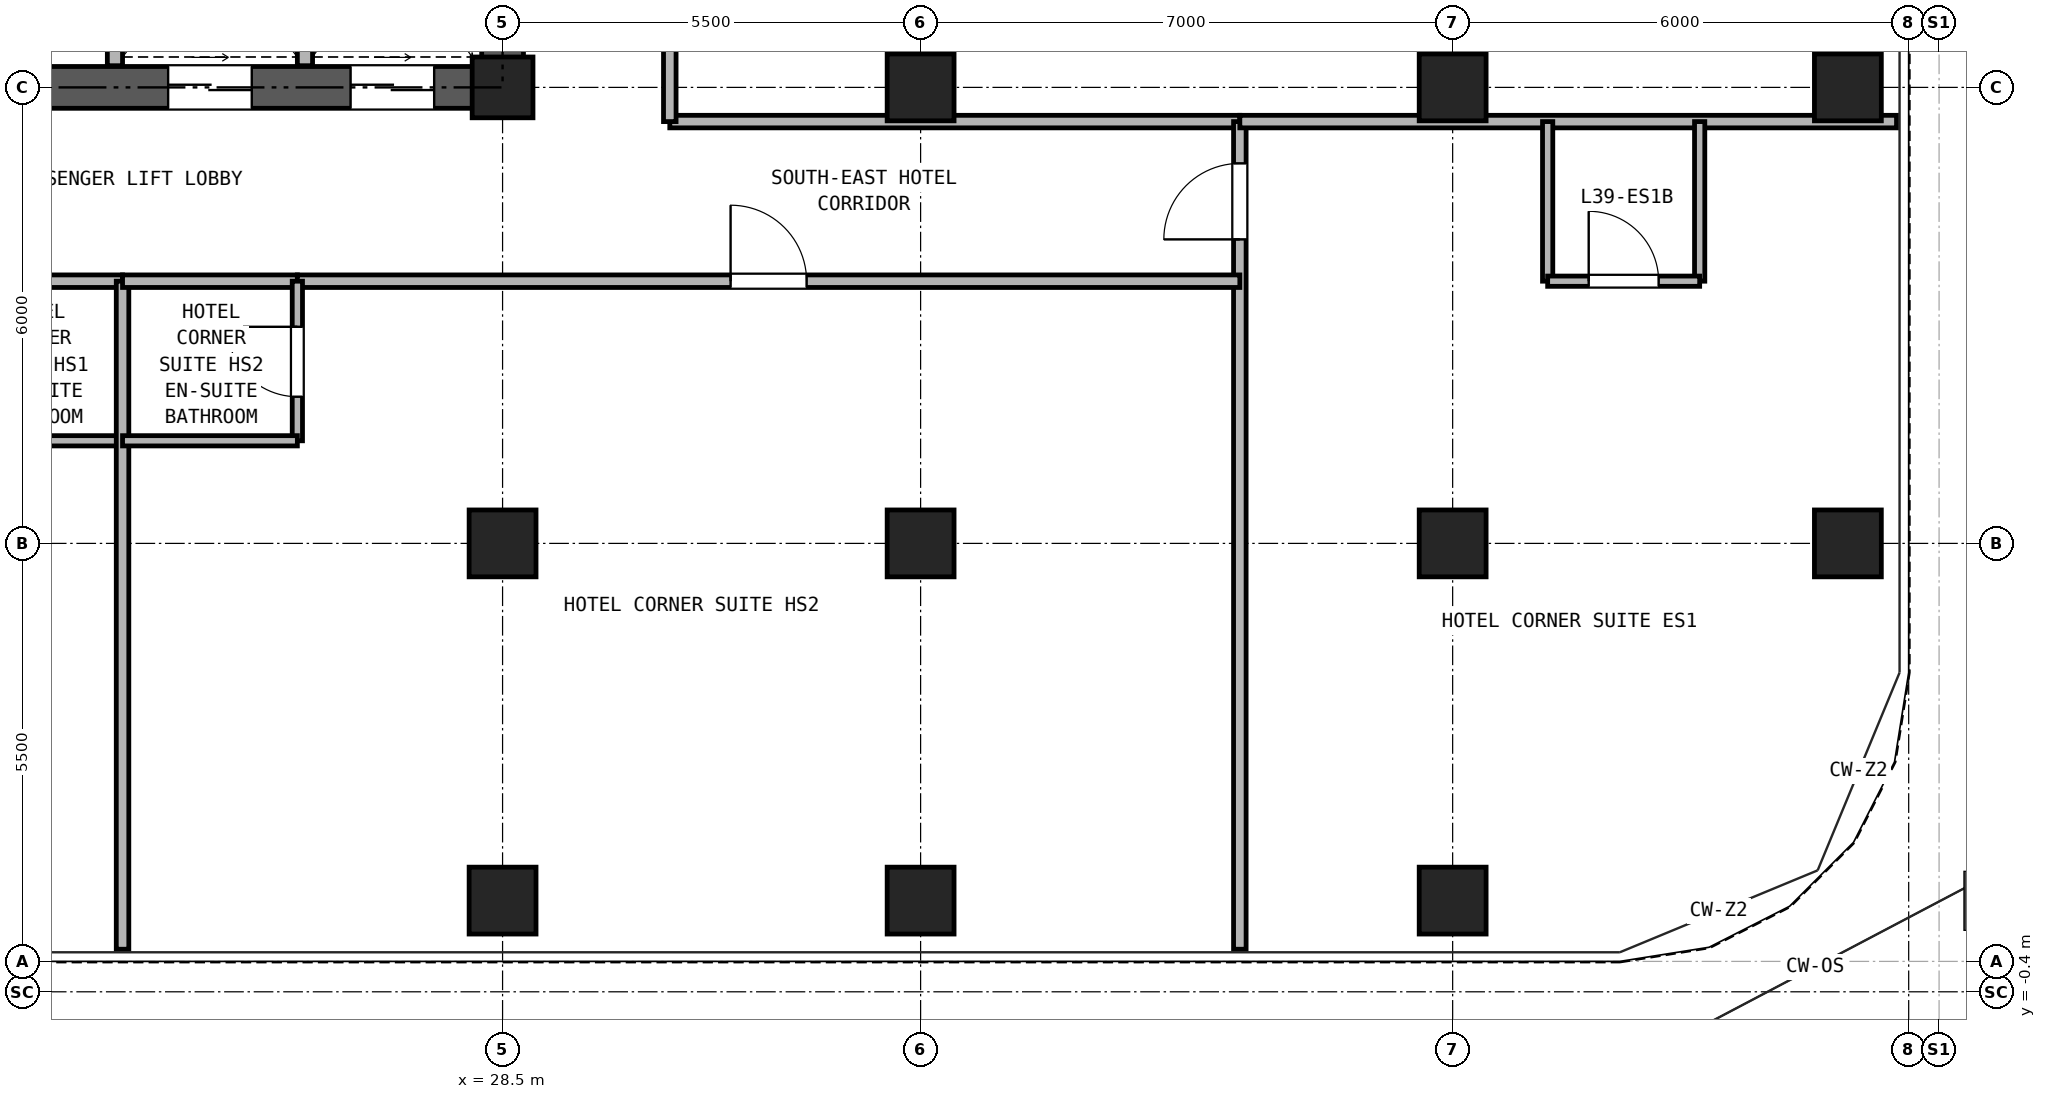
"""IFC4 building model, lengths in metres.
Left out: names, types, materials, properties, quantities, classifications, styles, units other than length and angle.
Written with IfcOpenShell. Run it as: python <this file> out.ifc"""

import sys

from ifc_helpers import new_model, si_unit, direction, frame, frame_2d, origin, origin_2d, place, context, subcontext, project, spatial, rectangle, hollow_rectangle, extrude, source, transform, mapped, element, fill, save


model = new_model("IFC4")
c1 = context("Model", 3, precision=1e-05, world=origin(), true_north=direction((0.0, 1.0)))
c2 = subcontext(c1, "Body", "Model", "MODEL_VIEW")
j1 = project(units=[si_unit("LENGTHUNIT", "METRE"), si_unit("PLANEANGLEUNIT", "RADIAN")], contexts=[c1])
p1 = place(None, origin())
s1 = spatial("IfcSite", under=j1, at=p1, CompositionType="ELEMENT")
p2 = place(p1, origin())
s2 = spatial("IfcBuilding", under=s1, at=p2, CompositionType="ELEMENT")
p3 = place(p2, frame((0.0, 0.0, 140.7)))
s3 = spatial("IfcBuildingStorey", under=s2, at=p3, CompositionType="ELEMENT", Elevation=140.7)
m1 = source(origin(), c2, "Body", "SweptSolid", [
    extrude(hollow_rectangle(XDim=0.88, YDim=0.88, WallThickness=0.05, at=origin_2d()), origin(), (0.0, 0.0, 1.0), 2.84),
])
for number, where, z_axis, x_axis in (
    (1, (28.5, 0.8, 0.0), (0.0, 0.0, 1.0), (1.0, 0.0, 0.0)),
    (2, (34.0, 0.8, 0.0), (0.0, 0.0, 1.0), (1.0, 0.0, 0.0)),
    (3, (41.0, 0.8, 0.0), (0.0, 0.0, 1.0), (1.0, 0.0, 0.0)),
    (4, (46.2, 5.5, 0.0), (0.0, 0.0, 1.0), (1.0, 0.0, 0.0)),
    (5, (46.2, 11.5, 0.0), (0.0, 0.0, 1.0), (1.0, 0.0, 0.0)),
    (6, (28.5, 5.5, 0.0), (0.0, 0.0, 1.0), (1.0, 0.0, 0.0)),
):
    element("IfcColumn", number, at=place(p3, frame(where, z_axis=z_axis, x_axis=x_axis)), inside=s3, PredefinedType="COLUMN", context=c2, shape_type="MappedRepresentation", body=[
        mapped(m1, transform((0.0, 0.0, 0.0), x_axis=(1.0, 0.0, 0.0), y_axis=(0.0, 1.0, 0.0), z_axis=(0.0, 0.0, 1.0), scale=1.0)),
    ])
m2 = source(origin(), c2, "Body", "SweptSolid", [
    extrude(hollow_rectangle(XDim=0.8, YDim=0.8, WallThickness=0.045, at=origin_2d()), origin(), (0.0, 0.0, 1.0), 2.84),
])
p4 = place(p3, frame((28.5, 11.5, 0.0), z_axis=(0.0, 0.0, 1.0), x_axis=(1.0, 0.0, 0.0)))
e7 = element("IfcColumn", 7, at=p4, inside=s3, PredefinedType="COLUMN", context=c2, shape_type="MappedRepresentation", body=[
    mapped(m2, transform((0.0, 0.0, 0.0), x_axis=(1.0, 0.0, 0.0), y_axis=(0.0, 1.0, 0.0), z_axis=(0.0, 0.0, 1.0), scale=1.0)),
])
for number, where, z_axis, x_axis in (
    (8, (34.0, 5.5, 0.0), (0.0, 0.0, 1.0), (1.0, 0.0, 0.0)),
    (9, (34.0, 11.5, 0.0), (0.0, 0.0, 1.0), (1.0, 0.0, 0.0)),
    (10, (41.0, 5.5, 0.0), (0.0, 0.0, 1.0), (1.0, 0.0, 0.0)),
    (11, (41.0, 11.5, 0.0), (0.0, 0.0, 1.0), (1.0, 0.0, 0.0)),
):
    element("IfcColumn", number, at=place(p3, frame(where, z_axis=z_axis, x_axis=x_axis)), inside=s3, PredefinedType="COLUMN", context=c2, shape_type="MappedRepresentation", body=[
        mapped(m1, transform((0.0, 0.0, 0.0), x_axis=(1.0, 0.0, 0.0), y_axis=(0.0, 1.0, 0.0), z_axis=(0.0, 0.0, 1.0), scale=1.0)),
    ])
p5 = place(p3, frame((18.225, 11.5, 0.0), z_axis=(0.0, 0.0, 1.0), x_axis=(1.0, 0.0, 0.0)))
e12 = element("IfcWall", 12, at=p5, inside=s3, PredefinedType="SHEAR", context=c2, shape_type="SweptSolid", body=[
    extrude(rectangle(XDim=10.55, YDim=0.55, at=frame_2d((5.275, 0.0))), origin(), (0.0, 0.0, 1.0), 2.84),
])
p6 = place(p5, frame((2.375, 0.0, 0.0)))
e13 = element("IfcOpeningElement", 13, at=p6, cuts=e12, PredefinedType="OPENING", context=c2, shape_type="SweptSolid", body=[
    extrude(rectangle(XDim=0.95, YDim=2.15, at=frame_2d((0.475, 1.075))), frame((0.0, 0.285, 0.0), z_axis=(0.0, -1.0, 0.0), x_axis=(1.0, 0.0, 0.0)), (0.0, 0.0, 1.0), 0.57),
])
p7 = place(p5, frame((5.875, 0.0, 0.0)))
e14 = element("IfcOpeningElement", 14, at=p7, cuts=e12, PredefinedType="OPENING", context=c2, shape_type="SweptSolid", body=[
    extrude(rectangle(XDim=1.1, YDim=2.25, at=frame_2d((0.55, 1.125))), frame((0.0, 0.285, 0.0), z_axis=(0.0, -1.0, 0.0), x_axis=(1.0, 0.0, 0.0)), (0.0, 0.0, 1.0), 0.57),
])
p8 = place(p5, frame((8.275, 0.0, 0.0)))
e15 = element("IfcOpeningElement", 15, at=p8, cuts=e12, PredefinedType="OPENING", context=c2, shape_type="SweptSolid", body=[
    extrude(rectangle(XDim=1.1, YDim=2.25, at=frame_2d((0.55, 1.125))), frame((0.0, 0.285, 0.0), z_axis=(0.0, -1.0, 0.0), x_axis=(1.0, 0.0, 0.0)), (0.0, 0.0, 1.0), 0.57),
])
p9 = place(p3, frame((28.5, 11.775, 0.0), z_axis=(0.0, 0.0, 1.0), x_axis=(0.0, 1.0, 0.0)))
e16 = element("IfcWall", 16, at=p9, inside=s3, PredefinedType="SHEAR", context=c2, shape_type="SweptSolid", body=[
    extrude(rectangle(XDim=16.7, YDim=0.55, at=frame_2d((8.35, 0.0))), origin(), (0.0, 0.0, 1.0), 2.84),
])
p10 = place(p9, frame((7.375, 0.0, 0.0)))
e17 = element("IfcOpeningElement", 17, at=p10, cuts=e16, PredefinedType="OPENING", context=c2, shape_type="SweptSolid", body=[
    extrude(rectangle(XDim=1.15, YDim=2.2, at=frame_2d((0.575, 1.1))), frame((0.0, 0.285, 0.0), z_axis=(0.0, -1.0, 0.0), x_axis=(1.0, 0.0, 0.0)), (0.0, 0.0, 1.0), 0.57),
])
for number, where, z_axis, x_axis in (
    (18, (23.4, 11.785, 0.0), (0.0, 0.0, 1.0), (0.0, 1.0, 0.0)),
    (19, (25.9, 11.785, 0.0), (0.0, 0.0, 1.0), (0.0, 1.0, 0.0)),
):
    element("IfcWall", number, at=place(p3, frame(where, z_axis=z_axis, x_axis=x_axis)), inside=s3, PredefinedType="PARTITIONING", context=c2, shape_type="SweptSolid", body=[
        extrude(rectangle(XDim=3.215, YDim=0.2, at=frame_2d((1.607, 0.0))), origin(), (0.0, 0.0, 1.0), 2.84),
    ])
p11 = place(p3, frame((30.7, 11.05, 0.0), z_axis=(0.0, 0.0, 1.0), x_axis=(1.0, 0.0, 0.0)))
e20 = element("IfcWall", 20, at=p11, inside=s3, PredefinedType="PARTITIONING", context=c2, shape_type="SweptSolid", body=[
    extrude(rectangle(XDim=7.5, YDim=0.165, at=frame_2d((3.75, 0.0))), origin(), (0.0, 0.0, 1.0), 2.84),
])
p12 = place(p3, frame((30.7, 11.05, 0.0), z_axis=(0.0, 0.0, 1.0), x_axis=(0.0, 1.0, 0.0)))
e21 = element("IfcWall", 21, at=p12, inside=s3, PredefinedType="PARTITIONING", context=c2, shape_type="SweptSolid", body=[
    extrude(rectangle(XDim=18.2, YDim=0.165, at=frame_2d((9.1, 0.0))), origin(), (0.0, 0.0, 1.0), 2.84),
])
p13 = place(p12, frame((4.05, 0.0, 0.0)))
e22 = element("IfcOpeningElement", 22, at=p13, cuts=e21, PredefinedType="OPENING", context=c2, shape_type="SweptSolid", body=[
    extrude(rectangle(XDim=0.95, YDim=2.15, at=frame_2d((0.475, 1.075))), frame((0.0, 0.093, 0.0), z_axis=(0.0, -1.0, 0.0), x_axis=(1.0, 0.0, 0.0)), (0.0, 0.0, 1.0), 0.185),
])
p14 = place(p12, frame((13.15, 0.0, 0.0)))
e23 = element("IfcOpeningElement", 23, at=p14, cuts=e21, PredefinedType="OPENING", context=c2, shape_type="SweptSolid", body=[
    extrude(rectangle(XDim=0.95, YDim=2.15, at=frame_2d((0.475, 1.075))), frame((0.0, 0.093, 0.0), z_axis=(0.0, -1.0, 0.0), x_axis=(1.0, 0.0, 0.0)), (0.0, 0.0, 1.0), 0.185),
])
p15 = place(p3, frame((38.2, 0.16, 0.0), z_axis=(0.0, 0.0, 1.0), x_axis=(0.0, 1.0, 0.0)))
e24 = element("IfcWall", 24, at=p15, inside=s3, PredefinedType="PARTITIONING", context=c2, shape_type="SweptSolid", body=[
    extrude(rectangle(XDim=10.89, YDim=0.165, at=frame_2d((5.445, 0.0))), origin(), (0.0, 0.0, 1.0), 2.84),
])
p16 = place(p15, frame((9.34, 0.0, 0.0)))
e25 = element("IfcOpeningElement", 25, at=p16, cuts=e24, PredefinedType="OPENING", context=c2, shape_type="SweptSolid", body=[
    extrude(rectangle(XDim=1.0, YDim=2.15, at=frame_2d((0.5, 1.075))), frame((0.0, 0.093, 0.0), z_axis=(0.0, -1.0, 0.0), x_axis=(1.0, 0.0, 0.0)), (0.0, 0.0, 1.0), 0.185),
])
p17 = place(p3, frame((38.2, 11.05, 0.0), z_axis=(0.0, 0.0, 1.0), x_axis=(1.0, 0.0, 0.0)))
e26 = element("IfcWall", 26, at=p17, inside=s3, PredefinedType="PARTITIONING", context=c2, shape_type="SweptSolid", body=[
    extrude(rectangle(XDim=8.64, YDim=0.165, at=frame_2d((4.32, 0.0))), origin(), (0.0, 0.0, 1.0), 2.84),
])
for number, where, z_axis, x_axis in (
    (27, (42.25, 8.95, 0.0), (0.0, 0.0, 1.0), (0.0, 1.0, 0.0)),
    (28, (44.25, 8.95, 0.0), (0.0, 0.0, 1.0), (0.0, 1.0, 0.0)),
):
    element("IfcWall", number, at=place(p3, frame(where, z_axis=z_axis, x_axis=x_axis)), inside=s3, PredefinedType="PARTITIONING", context=c2, shape_type="SweptSolid", body=[
        extrude(rectangle(XDim=2.1, YDim=0.135, at=frame_2d((1.05, 0.0))), origin(), (0.0, 0.0, 1.0), 2.84),
    ])
p18 = place(p3, frame((42.25, 8.95, 0.0), z_axis=(0.0, 0.0, 1.0), x_axis=(1.0, 0.0, 0.0)))
e29 = element("IfcWall", 29, at=p18, inside=s3, PredefinedType="PARTITIONING", context=c2, shape_type="SweptSolid", body=[
    extrude(rectangle(XDim=2.0, YDim=0.135, at=frame_2d((1.0, 0.0))), origin(), (0.0, 0.0, 1.0), 2.84),
])
p19 = place(p18, frame((0.54, 0.0, 0.0)))
e30 = element("IfcOpeningElement", 30, at=p19, cuts=e29, PredefinedType="OPENING", context=c2, shape_type="SweptSolid", body=[
    extrude(rectangle(XDim=0.92, YDim=2.1, at=frame_2d((0.46, 1.05))), frame((0.0, 0.077, 0.0), z_axis=(0.0, -1.0, 0.0), x_axis=(1.0, 0.0, 0.0)), (0.0, 0.0, 1.0), 0.155),
])
p20 = place(p3, frame((21.2, 8.95, 0.0), z_axis=(0.0, 0.0, 1.0), x_axis=(1.0, 0.0, 0.0)))
e31 = element("IfcWall", 31, at=p20, inside=s3, PredefinedType="PARTITIONING", context=c2, shape_type="SweptSolid", body=[
    extrude(rectangle(XDim=2.3, YDim=0.165, at=frame_2d((1.15, 0.0))), origin(), (0.0, 0.0, 1.0), 2.84),
])
p21 = place(p3, frame((21.2, 6.85, 0.0), z_axis=(0.0, 0.0, 1.0), x_axis=(1.0, 0.0, 0.0)))
e32 = element("IfcWall", 32, at=p21, inside=s3, PredefinedType="PARTITIONING", context=c2, shape_type="SweptSolid", body=[
    extrude(rectangle(XDim=2.3, YDim=0.135, at=frame_2d((1.15, 0.0))), origin(), (0.0, 0.0, 1.0), 2.84),
])
p22 = place(p3, frame((23.5, 0.16, 0.0), z_axis=(0.0, 0.0, 1.0), x_axis=(0.0, 1.0, 0.0)))
e33 = element("IfcWall", 33, at=p22, inside=s3, PredefinedType="PARTITIONING", context=c2, shape_type="SweptSolid", body=[
    extrude(rectangle(XDim=8.79, YDim=0.165, at=frame_2d((4.395, 0.0))), origin(), (0.0, 0.0, 1.0), 2.84),
])
p23 = place(p3, frame((23.5, 8.95, 0.0), z_axis=(0.0, 0.0, 1.0), x_axis=(1.0, 0.0, 0.0)))
e34 = element("IfcWall", 34, at=p23, inside=s3, PredefinedType="PARTITIONING", context=c2, shape_type="SweptSolid", body=[
    extrude(rectangle(XDim=2.3, YDim=0.165, at=frame_2d((1.15, 0.0))), origin(), (0.0, 0.0, 1.0), 2.84),
])
p24 = place(p3, frame((25.8, 8.95, 0.0), z_axis=(0.0, 0.0, 1.0), x_axis=(1.0, 0.0, 0.0)))
e35 = element("IfcWall", 35, at=p24, inside=s3, PredefinedType="PARTITIONING", context=c2, shape_type="SweptSolid", body=[
    extrude(rectangle(XDim=12.4, YDim=0.165, at=frame_2d((6.2, 0.0))), origin(), (0.0, 0.0, 1.0), 2.84),
])
p25 = place(p24, frame((5.7, 0.0, 0.0)))
e36 = element("IfcOpeningElement", 36, at=p25, cuts=e35, PredefinedType="OPENING", context=c2, shape_type="SweptSolid", body=[
    extrude(rectangle(XDim=1.0, YDim=2.15, at=frame_2d((0.5, 1.075))), frame((0.0, 0.093, 0.0), z_axis=(0.0, -1.0, 0.0), x_axis=(1.0, 0.0, 0.0)), (0.0, 0.0, 1.0), 0.185),
])
p26 = place(p3, frame((25.8, 6.85, 0.0), z_axis=(0.0, 0.0, 1.0), x_axis=(0.0, 1.0, 0.0)))
e37 = element("IfcWall", 37, at=p26, inside=s3, PredefinedType="PARTITIONING", context=c2, shape_type="SweptSolid", body=[
    extrude(rectangle(XDim=2.1, YDim=0.135, at=frame_2d((1.05, 0.0))), origin(), (0.0, 0.0, 1.0), 2.84),
])
p27 = place(p26, frame((0.58, 0.0, 0.0)))
e38 = element("IfcOpeningElement", 38, at=p27, cuts=e37, PredefinedType="OPENING", context=c2, shape_type="SweptSolid", body=[
    extrude(rectangle(XDim=0.92, YDim=2.1, at=frame_2d((0.46, 1.05))), frame((0.0, 0.077, 0.0), z_axis=(0.0, -1.0, 0.0), x_axis=(1.0, 0.0, 0.0)), (0.0, 0.0, 1.0), 0.155),
])
p28 = place(p3, frame((23.5, 6.85, 0.0), z_axis=(0.0, 0.0, 1.0), x_axis=(1.0, 0.0, 0.0)))
e39 = element("IfcWall", 39, at=p28, inside=s3, PredefinedType="PARTITIONING", context=c2, shape_type="SweptSolid", body=[
    extrude(rectangle(XDim=2.3, YDim=0.135, at=frame_2d((1.15, 0.0))), origin(), (0.0, 0.0, 1.0), 2.84),
])
p29 = place(p7, frame((1.1, 0.0, 0.0), z_axis=(0.0, 0.0, 1.0), x_axis=(-1.0, 0.0, 0.0)))
e40 = element("IfcDoor", 40, at=p29, inside=s3, OperationType="DOUBLE_DOOR_SLIDING", PredefinedType="DOOR", context=c2, shape_type="SweptSolid", body=[
    extrude(rectangle(XDim=1.1, YDim=2.25, at=frame_2d((0.55, 1.125))), frame((0.0, 0.025, 0.0), z_axis=(0.0, -1.0, 0.0), x_axis=(1.0, 0.0, 0.0)), (0.0, 0.0, 1.0), 0.05),
])
fill(e14, e40)
p30 = place(p8, frame((1.1, 0.0, 0.0), z_axis=(0.0, 0.0, 1.0), x_axis=(-1.0, 0.0, 0.0)))
e41 = element("IfcDoor", 41, at=p30, inside=s3, OperationType="DOUBLE_DOOR_SLIDING", PredefinedType="DOOR", context=c2, shape_type="SweptSolid", body=[
    extrude(rectangle(XDim=1.1, YDim=2.25, at=frame_2d((0.55, 1.125))), frame((0.0, 0.025, 0.0), z_axis=(0.0, -1.0, 0.0), x_axis=(1.0, 0.0, 0.0)), (0.0, 0.0, 1.0), 0.05),
])
fill(e15, e41)
p31 = place(p19, origin())
e42 = element("IfcDoor", 42, at=p31, inside=s3, OperationType="SINGLE_SWING_LEFT", PredefinedType="DOOR", context=c2, shape_type="SweptSolid", body=[
    extrude(rectangle(XDim=0.92, YDim=2.1, at=frame_2d((0.46, 1.05))), frame((0.0, 0.025, 0.0), z_axis=(0.0, -1.0, 0.0), x_axis=(1.0, 0.0, 0.0)), (0.0, 0.0, 1.0), 0.05),
])
fill(e30, e42)
p32 = place(p16, frame((1.0, 0.0, 0.0), z_axis=(0.0, 0.0, 1.0), x_axis=(-1.0, 0.0, 0.0)))
e43 = element("IfcDoor", 43, at=p32, inside=s3, OperationType="SINGLE_SWING_LEFT", PredefinedType="DOOR", context=c2, shape_type="SweptSolid", body=[
    extrude(rectangle(XDim=1.0, YDim=2.15, at=frame_2d((0.5, 1.075))), frame((0.0, 0.025, 0.0), z_axis=(0.0, -1.0, 0.0), x_axis=(1.0, 0.0, 0.0)), (0.0, 0.0, 1.0), 0.05),
])
fill(e25, e43)
p33 = place(p27, frame((0.92, 0.0, 0.0), z_axis=(0.0, 0.0, 1.0), x_axis=(-1.0, 0.0, 0.0)))
e44 = element("IfcDoor", 44, at=p33, inside=s3, OperationType="SINGLE_SWING_RIGHT", PredefinedType="DOOR", context=c2, shape_type="SweptSolid", body=[
    extrude(rectangle(XDim=0.92, YDim=2.1, at=frame_2d((0.46, 1.05))), frame((0.0, 0.025, 0.0), z_axis=(0.0, -1.0, 0.0), x_axis=(1.0, 0.0, 0.0)), (0.0, 0.0, 1.0), 0.05),
])
fill(e38, e44)
p34 = place(p25, frame((1.0, 0.0, 0.0), z_axis=(0.0, 0.0, 1.0), x_axis=(-1.0, 0.0, 0.0)))
e45 = element("IfcDoor", 45, at=p34, inside=s3, OperationType="SINGLE_SWING_LEFT", PredefinedType="DOOR", context=c2, shape_type="SweptSolid", body=[
    extrude(rectangle(XDim=1.0, YDim=2.15, at=frame_2d((0.5, 1.075))), frame((0.0, 0.025, 0.0), z_axis=(0.0, -1.0, 0.0), x_axis=(1.0, 0.0, 0.0)), (0.0, 0.0, 1.0), 0.05),
])
fill(e36, e45)
save(model, sys.argv[1])
